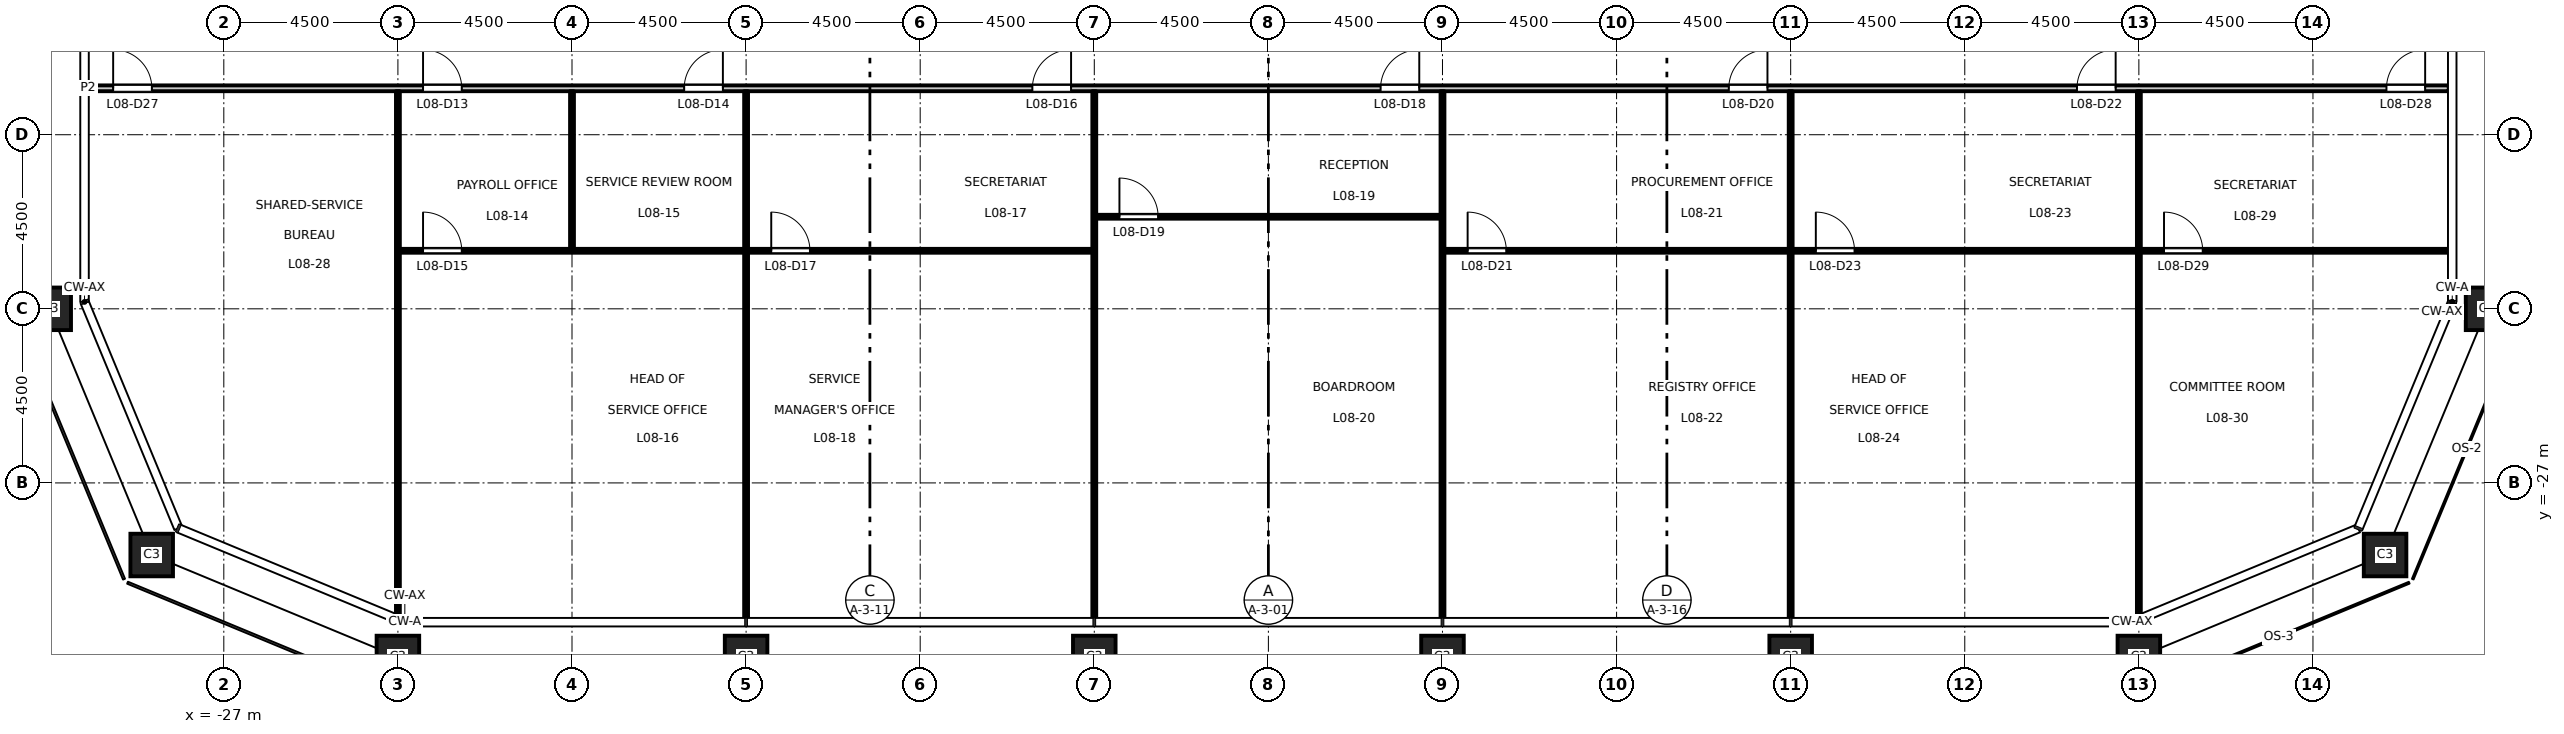
"""IFC4 building model, lengths in metres.
Left out: names, types, materials, properties, quantities, classifications, styles, units other than length and angle.
Written with IfcOpenShell. Run it as: python <this file> out.ifc"""

import sys

from ifc_helpers import new_model, si_unit, direction, frame, frame_2d, origin, origin_2d, place, context, subcontext, project, spatial, rectangle, hollow_rectangle, extrude, element, fill, save


model = new_model("IFC4")
c1 = context("Model", 3, precision=1e-05, world=origin(), true_north=direction((0.0, 1.0)))
c2 = subcontext(c1, "Body", "Model", "MODEL_VIEW")
j1 = project(units=[si_unit("LENGTHUNIT", "METRE"), si_unit("PLANEANGLEUNIT", "RADIAN")], contexts=[c1])
p1 = place(None, origin())
s1 = spatial("IfcSite", under=j1, at=p1, CompositionType="ELEMENT")
p2 = place(p1, origin())
s2 = spatial("IfcBuilding", under=s1, at=p2, CompositionType="ELEMENT")
p3 = place(p2, frame((0.0, 0.0, 40.2)))
s3 = spatial("IfcBuildingStorey", under=s2, at=p3, CompositionType="ELEMENT", Elevation=40.2)
for number, where, z_axis, x_axis in (
    (1, (-22.5, -31.5, 0.0), (0.0, 0.0, 1.0), (1.0, 0.0, 0.0)),
    (2, (-13.5, -31.5, 0.0), (0.0, 0.0, 1.0), (1.0, 0.0, 0.0)),
    (3, (-4.5, -31.5, 0.0), (0.0, 0.0, 1.0), (1.0, 0.0, 0.0)),
    (4, (4.5, -31.5, 0.0), (0.0, 0.0, 1.0), (1.0, 0.0, 0.0)),
    (5, (13.5, -31.5, 0.0), (0.0, 0.0, 1.0), (1.0, 0.0, 0.0)),
    (6, (22.5, -31.5, 0.0), (0.0, 0.0, 1.0), (1.0, 0.0, 0.0)),
    (7, (28.864, -28.864, 0.0), (0.0, 0.0, 1.0), (1.0, 0.0, 0.0)),
    (8, (31.5, -22.5, 0.0), (0.0, 0.0, 1.0), (1.0, 0.0, 0.0)),
    (9, (-31.5, -22.5, 0.0), (0.0, 0.0, 1.0), (1.0, 0.0, 0.0)),
    (10, (-28.864, -28.864, 0.0), (0.0, 0.0, 1.0), (1.0, 0.0, 0.0)),
):
    element("IfcColumn", number, at=place(p3, frame(where, z_axis=z_axis, x_axis=x_axis)), inside=s3, PredefinedType="COLUMN", context=c2, shape_type="SweptSolid", body=[
        extrude(hollow_rectangle(XDim=1.1, YDim=1.1, WallThickness=0.07, at=origin_2d()), origin(), (0.0, 0.0, 1.0), 4.5),
    ])
p4 = place(p3, frame((-22.45, -21.0, 0.0), z_axis=(0.0, 0.0, 1.0), x_axis=(1.0, 0.0, 0.0)))
e11 = element("IfcWall", 11, at=p4, inside=s3, PredefinedType="PARTITIONING", context=c2, shape_type="SweptSolid", body=[
    extrude(rectangle(XDim=17.9, YDim=0.1, at=frame_2d((8.95, 0.0))), origin(), (0.0, 0.0, 1.0), 4.35),
])
p5 = place(p4, frame((0.6, 0.0, 0.0)))
e12 = element("IfcOpeningElement", 12, at=p5, cuts=e11, PredefinedType="OPENING", context=c2, shape_type="SweptSolid", body=[
    extrude(rectangle(XDim=1.0, YDim=2.1, at=frame_2d((0.5, 1.05))), frame((0.0, 0.06, 0.0), z_axis=(0.0, -1.0, 0.0), x_axis=(1.0, 0.0, 0.0)), (0.0, 0.0, 1.0), 0.12),
])
p6 = place(p4, frame((9.6, 0.0, 0.0)))
e13 = element("IfcOpeningElement", 13, at=p6, cuts=e11, PredefinedType="OPENING", context=c2, shape_type="SweptSolid", body=[
    extrude(rectangle(XDim=1.0, YDim=2.1, at=frame_2d((0.5, 1.05))), frame((0.0, 0.06, 0.0), z_axis=(0.0, -1.0, 0.0), x_axis=(1.0, 0.0, 0.0)), (0.0, 0.0, 1.0), 0.12),
])
p7 = place(p3, frame((4.55, -21.0, 0.0), z_axis=(0.0, 0.0, 1.0), x_axis=(1.0, 0.0, 0.0)))
e14 = element("IfcWall", 14, at=p7, inside=s3, PredefinedType="PARTITIONING", context=c2, shape_type="SweptSolid", body=[
    extrude(rectangle(XDim=25.96, YDim=0.1, at=frame_2d((12.98, 0.0))), origin(), (0.0, 0.0, 1.0), 4.35),
])
p8 = place(p7, frame((0.6, 0.0, 0.0)))
e15 = element("IfcOpeningElement", 15, at=p8, cuts=e14, PredefinedType="OPENING", context=c2, shape_type="SweptSolid", body=[
    extrude(rectangle(XDim=1.0, YDim=2.1, at=frame_2d((0.5, 1.05))), frame((0.0, 0.06, 0.0), z_axis=(0.0, -1.0, 0.0), x_axis=(1.0, 0.0, 0.0)), (0.0, 0.0, 1.0), 0.12),
])
p9 = place(p7, frame((9.6, 0.0, 0.0)))
e16 = element("IfcOpeningElement", 16, at=p9, cuts=e14, PredefinedType="OPENING", context=c2, shape_type="SweptSolid", body=[
    extrude(rectangle(XDim=1.0, YDim=2.1, at=frame_2d((0.5, 1.05))), frame((0.0, 0.06, 0.0), z_axis=(0.0, -1.0, 0.0), x_axis=(1.0, 0.0, 0.0)), (0.0, 0.0, 1.0), 0.12),
])
p10 = place(p7, frame((18.6, 0.0, 0.0)))
e17 = element("IfcOpeningElement", 17, at=p10, cuts=e14, PredefinedType="OPENING", context=c2, shape_type="SweptSolid", body=[
    extrude(rectangle(XDim=1.0, YDim=2.1, at=frame_2d((0.5, 1.05))), frame((0.0, 0.06, 0.0), z_axis=(0.0, -1.0, 0.0), x_axis=(1.0, 0.0, 0.0)), (0.0, 0.0, 1.0), 0.12),
])
p11 = place(p3, frame((-4.45, -20.12, 0.0), z_axis=(0.0, 0.0, 1.0), x_axis=(1.0, 0.0, 0.0)))
e18 = element("IfcWall", 18, at=p11, inside=s3, PredefinedType="PARTITIONING", context=c2, shape_type="SweptSolid", body=[
    extrude(rectangle(XDim=8.9, YDim=0.1, at=frame_2d((4.45, 0.0))), origin(), (0.0, 0.0, 1.0), 4.35),
])
p12 = place(p11, frame((0.6, 0.0, 0.0)))
e19 = element("IfcOpeningElement", 19, at=p12, cuts=e18, PredefinedType="OPENING", context=c2, shape_type="SweptSolid", body=[
    extrude(rectangle(XDim=1.0, YDim=2.1, at=frame_2d((0.5, 1.05))), frame((0.0, 0.06, 0.0), z_axis=(0.0, -1.0, 0.0), x_axis=(1.0, 0.0, 0.0)), (0.0, 0.0, 1.0), 0.12),
])
p13 = place(p3, frame((-30.51, -16.8, 0.0), z_axis=(0.0, 0.0, 1.0), x_axis=(1.0, 0.0, 0.0)))
e20 = element("IfcWall", 20, at=p13, inside=s3, PredefinedType="PARTITIONING", context=c2, shape_type="SweptSolid", body=[
    extrude(rectangle(XDim=61.02, YDim=0.15, at=frame_2d((30.51, 0.0))), origin(), (0.0, 0.0, 1.0), 4.35),
])
p14 = place(p13, frame((8.66, 0.0, 0.0)))
e21 = element("IfcOpeningElement", 21, at=p14, cuts=e20, PredefinedType="OPENING", context=c2, shape_type="SweptSolid", body=[
    extrude(rectangle(XDim=1.0, YDim=2.1, at=frame_2d((0.5, 1.05))), frame((0.0, 0.085, 0.0), z_axis=(0.0, -1.0, 0.0), x_axis=(1.0, 0.0, 0.0)), (0.0, 0.0, 1.0), 0.17),
])
p15 = place(p13, frame((15.41, 0.0, 0.0)))
e22 = element("IfcOpeningElement", 22, at=p15, cuts=e20, PredefinedType="OPENING", context=c2, shape_type="SweptSolid", body=[
    extrude(rectangle(XDim=1.0, YDim=2.1, at=frame_2d((0.5, 1.05))), frame((0.0, 0.085, 0.0), z_axis=(0.0, -1.0, 0.0), x_axis=(1.0, 0.0, 0.0)), (0.0, 0.0, 1.0), 0.17),
])
p16 = place(p13, frame((24.41, 0.0, 0.0)))
e23 = element("IfcOpeningElement", 23, at=p16, cuts=e20, PredefinedType="OPENING", context=c2, shape_type="SweptSolid", body=[
    extrude(rectangle(XDim=1.0, YDim=2.1, at=frame_2d((0.5, 1.05))), frame((0.0, 0.085, 0.0), z_axis=(0.0, -1.0, 0.0), x_axis=(1.0, 0.0, 0.0)), (0.0, 0.0, 1.0), 0.17),
])
p17 = place(p13, frame((33.41, 0.0, 0.0)))
e24 = element("IfcOpeningElement", 24, at=p17, cuts=e20, PredefinedType="OPENING", context=c2, shape_type="SweptSolid", body=[
    extrude(rectangle(XDim=1.0, YDim=2.1, at=frame_2d((0.5, 1.05))), frame((0.0, 0.085, 0.0), z_axis=(0.0, -1.0, 0.0), x_axis=(1.0, 0.0, 0.0)), (0.0, 0.0, 1.0), 0.17),
])
p18 = place(p13, frame((42.41, 0.0, 0.0)))
e25 = element("IfcOpeningElement", 25, at=p18, cuts=e20, PredefinedType="OPENING", context=c2, shape_type="SweptSolid", body=[
    extrude(rectangle(XDim=1.0, YDim=2.1, at=frame_2d((0.5, 1.05))), frame((0.0, 0.085, 0.0), z_axis=(0.0, -1.0, 0.0), x_axis=(1.0, 0.0, 0.0)), (0.0, 0.0, 1.0), 0.17),
])
p19 = place(p13, frame((51.41, 0.0, 0.0)))
e26 = element("IfcOpeningElement", 26, at=p19, cuts=e20, PredefinedType="OPENING", context=c2, shape_type="SweptSolid", body=[
    extrude(rectangle(XDim=1.0, YDim=2.1, at=frame_2d((0.5, 1.05))), frame((0.0, 0.085, 0.0), z_axis=(0.0, -1.0, 0.0), x_axis=(1.0, 0.0, 0.0)), (0.0, 0.0, 1.0), 0.17),
])
p20 = place(p13, frame((0.65, 0.0, 0.0)))
e27 = element("IfcOpeningElement", 27, at=p20, cuts=e20, PredefinedType="OPENING", context=c2, shape_type="SweptSolid", body=[
    extrude(rectangle(XDim=1.0, YDim=2.1, at=frame_2d((0.5, 1.05))), frame((0.0, 0.085, 0.0), z_axis=(0.0, -1.0, 0.0), x_axis=(1.0, 0.0, 0.0)), (0.0, 0.0, 1.0), 0.17),
])
p21 = place(p13, frame((59.41, 0.0, 0.0)))
e28 = element("IfcOpeningElement", 28, at=p21, cuts=e20, PredefinedType="OPENING", context=c2, shape_type="SweptSolid", body=[
    extrude(rectangle(XDim=1.0, YDim=2.1, at=frame_2d((0.5, 1.05))), frame((0.0, 0.085, 0.0), z_axis=(0.0, -1.0, 0.0), x_axis=(1.0, 0.0, 0.0)), (0.0, 0.0, 1.0), 0.17),
])
p22 = place(p3, frame((-22.5, -30.428, 0.0), z_axis=(0.0, 0.0, 1.0), x_axis=(0.0, 1.0, 0.0)))
e29 = element("IfcWall", 29, at=p22, inside=s3, PredefinedType="PARTITIONING", context=c2, shape_type="SweptSolid", body=[
    extrude(rectangle(XDim=13.553, YDim=0.1, at=frame_2d((6.776, 0.0))), origin(), (0.0, 0.0, 1.0), 3.35),
])
p23 = place(p3, frame((-18.0, -20.95, 0.0), z_axis=(0.0, 0.0, 1.0), x_axis=(0.0, 1.0, 0.0)))
e30 = element("IfcWall", 30, at=p23, inside=s3, PredefinedType="PARTITIONING", context=c2, shape_type="SweptSolid", body=[
    extrude(rectangle(XDim=4.075, YDim=0.1, at=frame_2d((2.038, 0.0))), origin(), (0.0, 0.0, 1.0), 4.35),
])
p24 = place(p3, frame((-13.5, -30.51, 0.0), z_axis=(0.0, 0.0, 1.0), x_axis=(0.0, 1.0, 0.0)))
e31 = element("IfcWall", 31, at=p24, inside=s3, PredefinedType="PARTITIONING", context=c2, shape_type="SweptSolid", body=[
    extrude(rectangle(XDim=9.46, YDim=0.1, at=frame_2d((4.73, 0.0))), origin(), (0.0, 0.0, 1.0), 3.35),
])
p25 = place(p3, frame((-13.5, -20.95, 0.0), z_axis=(0.0, 0.0, 1.0), x_axis=(0.0, 1.0, 0.0)))
e32 = element("IfcWall", 32, at=p25, inside=s3, PredefinedType="PARTITIONING", context=c2, shape_type="SweptSolid", body=[
    extrude(rectangle(XDim=4.075, YDim=0.1, at=frame_2d((2.038, 0.0))), origin(), (0.0, 0.0, 1.0), 3.35),
])
for number, where, z_axis, x_axis in (
    (33, (-4.5, -30.51, 0.0), (0.0, 0.0, 1.0), (0.0, 1.0, 0.0)),
    (34, (4.5, -30.51, 0.0), (0.0, 0.0, 1.0), (0.0, 1.0, 0.0)),
):
    element("IfcWall", number, at=place(p3, frame(where, z_axis=z_axis, x_axis=x_axis)), inside=s3, PredefinedType="PARTITIONING", context=c2, shape_type="SweptSolid", body=[
        extrude(rectangle(XDim=13.635, YDim=0.1, at=frame_2d((6.817, 0.0))), origin(), (0.0, 0.0, 1.0), 3.35),
    ])
p26 = place(p3, frame((13.5, -30.51, 0.0), z_axis=(0.0, 0.0, 1.0), x_axis=(0.0, 1.0, 0.0)))
e35 = element("IfcWall", 35, at=p26, inside=s3, PredefinedType="PARTITIONING", context=c2, shape_type="SweptSolid", body=[
    extrude(rectangle(XDim=9.46, YDim=0.1, at=frame_2d((4.73, 0.0))), origin(), (0.0, 0.0, 1.0), 3.35),
])
p27 = place(p3, frame((13.5, -20.95, 0.0), z_axis=(0.0, 0.0, 1.0), x_axis=(0.0, 1.0, 0.0)))
e36 = element("IfcWall", 36, at=p27, inside=s3, PredefinedType="PARTITIONING", context=c2, shape_type="SweptSolid", body=[
    extrude(rectangle(XDim=4.075, YDim=0.1, at=frame_2d((2.038, 0.0))), origin(), (0.0, 0.0, 1.0), 3.35),
])
p28 = place(p3, frame((22.5, -30.428, 0.0), z_axis=(0.0, 0.0, 1.0), x_axis=(0.0, 1.0, 0.0)))
e37 = element("IfcWall", 37, at=p28, inside=s3, PredefinedType="PARTITIONING", context=c2, shape_type="SweptSolid", body=[
    extrude(rectangle(XDim=9.378, YDim=0.1, at=frame_2d((4.689, 0.0))), origin(), (0.0, 0.0, 1.0), 3.35),
])
p29 = place(p3, frame((22.5, -20.95, 0.0), z_axis=(0.0, 0.0, 1.0), x_axis=(0.0, 1.0, 0.0)))
e38 = element("IfcWall", 38, at=p29, inside=s3, PredefinedType="PARTITIONING", context=c2, shape_type="SweptSolid", body=[
    extrude(rectangle(XDim=4.075, YDim=0.1, at=frame_2d((2.038, 0.0))), origin(), (0.0, 0.0, 1.0), 3.35),
])
p30 = place(p14, origin())
e39 = element("IfcDoor", 39, at=p30, inside=s3, OperationType="SINGLE_SWING_LEFT", PredefinedType="DOOR", context=c2, shape_type="SweptSolid", body=[
    extrude(rectangle(XDim=1.0, YDim=2.1, at=frame_2d((0.5, 1.05))), frame((0.0, 0.025, 0.0), z_axis=(0.0, -1.0, 0.0), x_axis=(1.0, 0.0, 0.0)), (0.0, 0.0, 1.0), 0.05),
])
fill(e21, e39)
p31 = place(p15, origin())
e40 = element("IfcDoor", 40, at=p31, inside=s3, OperationType="SINGLE_SWING_RIGHT", PredefinedType="DOOR", context=c2, shape_type="SweptSolid", body=[
    extrude(rectangle(XDim=1.0, YDim=2.1, at=frame_2d((0.5, 1.05))), frame((0.0, 0.025, 0.0), z_axis=(0.0, -1.0, 0.0), x_axis=(1.0, 0.0, 0.0)), (0.0, 0.0, 1.0), 0.05),
])
fill(e22, e40)
p32 = place(p5, origin())
e41 = element("IfcDoor", 41, at=p32, inside=s3, OperationType="SINGLE_SWING_LEFT", PredefinedType="DOOR", context=c2, shape_type="SweptSolid", body=[
    extrude(rectangle(XDim=1.0, YDim=2.1, at=frame_2d((0.5, 1.05))), frame((0.0, 0.025, 0.0), z_axis=(0.0, -1.0, 0.0), x_axis=(1.0, 0.0, 0.0)), (0.0, 0.0, 1.0), 0.05),
])
fill(e12, e41)
p33 = place(p16, origin())
e42 = element("IfcDoor", 42, at=p33, inside=s3, OperationType="SINGLE_SWING_RIGHT", PredefinedType="DOOR", context=c2, shape_type="SweptSolid", body=[
    extrude(rectangle(XDim=1.0, YDim=2.1, at=frame_2d((0.5, 1.05))), frame((0.0, 0.025, 0.0), z_axis=(0.0, -1.0, 0.0), x_axis=(1.0, 0.0, 0.0)), (0.0, 0.0, 1.0), 0.05),
])
fill(e23, e42)
p34 = place(p6, origin())
e43 = element("IfcDoor", 43, at=p34, inside=s3, OperationType="SINGLE_SWING_LEFT", PredefinedType="DOOR", context=c2, shape_type="SweptSolid", body=[
    extrude(rectangle(XDim=1.0, YDim=2.1, at=frame_2d((0.5, 1.05))), frame((0.0, 0.025, 0.0), z_axis=(0.0, -1.0, 0.0), x_axis=(1.0, 0.0, 0.0)), (0.0, 0.0, 1.0), 0.05),
])
fill(e13, e43)
p35 = place(p17, origin())
e44 = element("IfcDoor", 44, at=p35, inside=s3, OperationType="SINGLE_SWING_RIGHT", PredefinedType="DOOR", context=c2, shape_type="SweptSolid", body=[
    extrude(rectangle(XDim=1.0, YDim=2.1, at=frame_2d((0.5, 1.05))), frame((0.0, 0.025, 0.0), z_axis=(0.0, -1.0, 0.0), x_axis=(1.0, 0.0, 0.0)), (0.0, 0.0, 1.0), 0.05),
])
fill(e24, e44)
p36 = place(p12, origin())
e45 = element("IfcDoor", 45, at=p36, inside=s3, OperationType="SINGLE_SWING_LEFT", PredefinedType="DOOR", context=c2, shape_type="SweptSolid", body=[
    extrude(rectangle(XDim=1.0, YDim=2.1, at=frame_2d((0.5, 1.05))), frame((0.0, 0.025, 0.0), z_axis=(0.0, -1.0, 0.0), x_axis=(1.0, 0.0, 0.0)), (0.0, 0.0, 1.0), 0.05),
])
fill(e19, e45)
p37 = place(p18, origin())
e46 = element("IfcDoor", 46, at=p37, inside=s3, OperationType="SINGLE_SWING_RIGHT", PredefinedType="DOOR", context=c2, shape_type="SweptSolid", body=[
    extrude(rectangle(XDim=1.0, YDim=2.1, at=frame_2d((0.5, 1.05))), frame((0.0, 0.025, 0.0), z_axis=(0.0, -1.0, 0.0), x_axis=(1.0, 0.0, 0.0)), (0.0, 0.0, 1.0), 0.05),
])
fill(e25, e46)
p38 = place(p8, origin())
e47 = element("IfcDoor", 47, at=p38, inside=s3, OperationType="SINGLE_SWING_LEFT", PredefinedType="DOOR", context=c2, shape_type="SweptSolid", body=[
    extrude(rectangle(XDim=1.0, YDim=2.1, at=frame_2d((0.5, 1.05))), frame((0.0, 0.025, 0.0), z_axis=(0.0, -1.0, 0.0), x_axis=(1.0, 0.0, 0.0)), (0.0, 0.0, 1.0), 0.05),
])
fill(e15, e47)
p39 = place(p19, origin())
e48 = element("IfcDoor", 48, at=p39, inside=s3, OperationType="SINGLE_SWING_RIGHT", PredefinedType="DOOR", context=c2, shape_type="SweptSolid", body=[
    extrude(rectangle(XDim=1.0, YDim=2.1, at=frame_2d((0.5, 1.05))), frame((0.0, 0.025, 0.0), z_axis=(0.0, -1.0, 0.0), x_axis=(1.0, 0.0, 0.0)), (0.0, 0.0, 1.0), 0.05),
])
fill(e26, e48)
p40 = place(p9, origin())
e49 = element("IfcDoor", 49, at=p40, inside=s3, OperationType="SINGLE_SWING_LEFT", PredefinedType="DOOR", context=c2, shape_type="SweptSolid", body=[
    extrude(rectangle(XDim=1.0, YDim=2.1, at=frame_2d((0.5, 1.05))), frame((0.0, 0.025, 0.0), z_axis=(0.0, -1.0, 0.0), x_axis=(1.0, 0.0, 0.0)), (0.0, 0.0, 1.0), 0.05),
])
fill(e16, e49)
p41 = place(p20, origin())
e50 = element("IfcDoor", 50, at=p41, inside=s3, OperationType="SINGLE_SWING_LEFT", PredefinedType="DOOR", context=c2, shape_type="SweptSolid", body=[
    extrude(rectangle(XDim=1.0, YDim=2.1, at=frame_2d((0.5, 1.05))), frame((0.0, 0.025, 0.0), z_axis=(0.0, -1.0, 0.0), x_axis=(1.0, 0.0, 0.0)), (0.0, 0.0, 1.0), 0.05),
])
fill(e27, e50)
p42 = place(p21, origin())
e51 = element("IfcDoor", 51, at=p42, inside=s3, OperationType="SINGLE_SWING_RIGHT", PredefinedType="DOOR", context=c2, shape_type="SweptSolid", body=[
    extrude(rectangle(XDim=1.0, YDim=2.1, at=frame_2d((0.5, 1.05))), frame((0.0, 0.025, 0.0), z_axis=(0.0, -1.0, 0.0), x_axis=(1.0, 0.0, 0.0)), (0.0, 0.0, 1.0), 0.05),
])
fill(e28, e51)
p43 = place(p10, origin())
e52 = element("IfcDoor", 52, at=p43, inside=s3, OperationType="SINGLE_SWING_LEFT", PredefinedType="DOOR", context=c2, shape_type="SweptSolid", body=[
    extrude(rectangle(XDim=1.0, YDim=2.1, at=frame_2d((0.5, 1.05))), frame((0.0, 0.025, 0.0), z_axis=(0.0, -1.0, 0.0), x_axis=(1.0, 0.0, 0.0)), (0.0, 0.0, 1.0), 0.05),
])
fill(e17, e52)
save(model, sys.argv[1])
